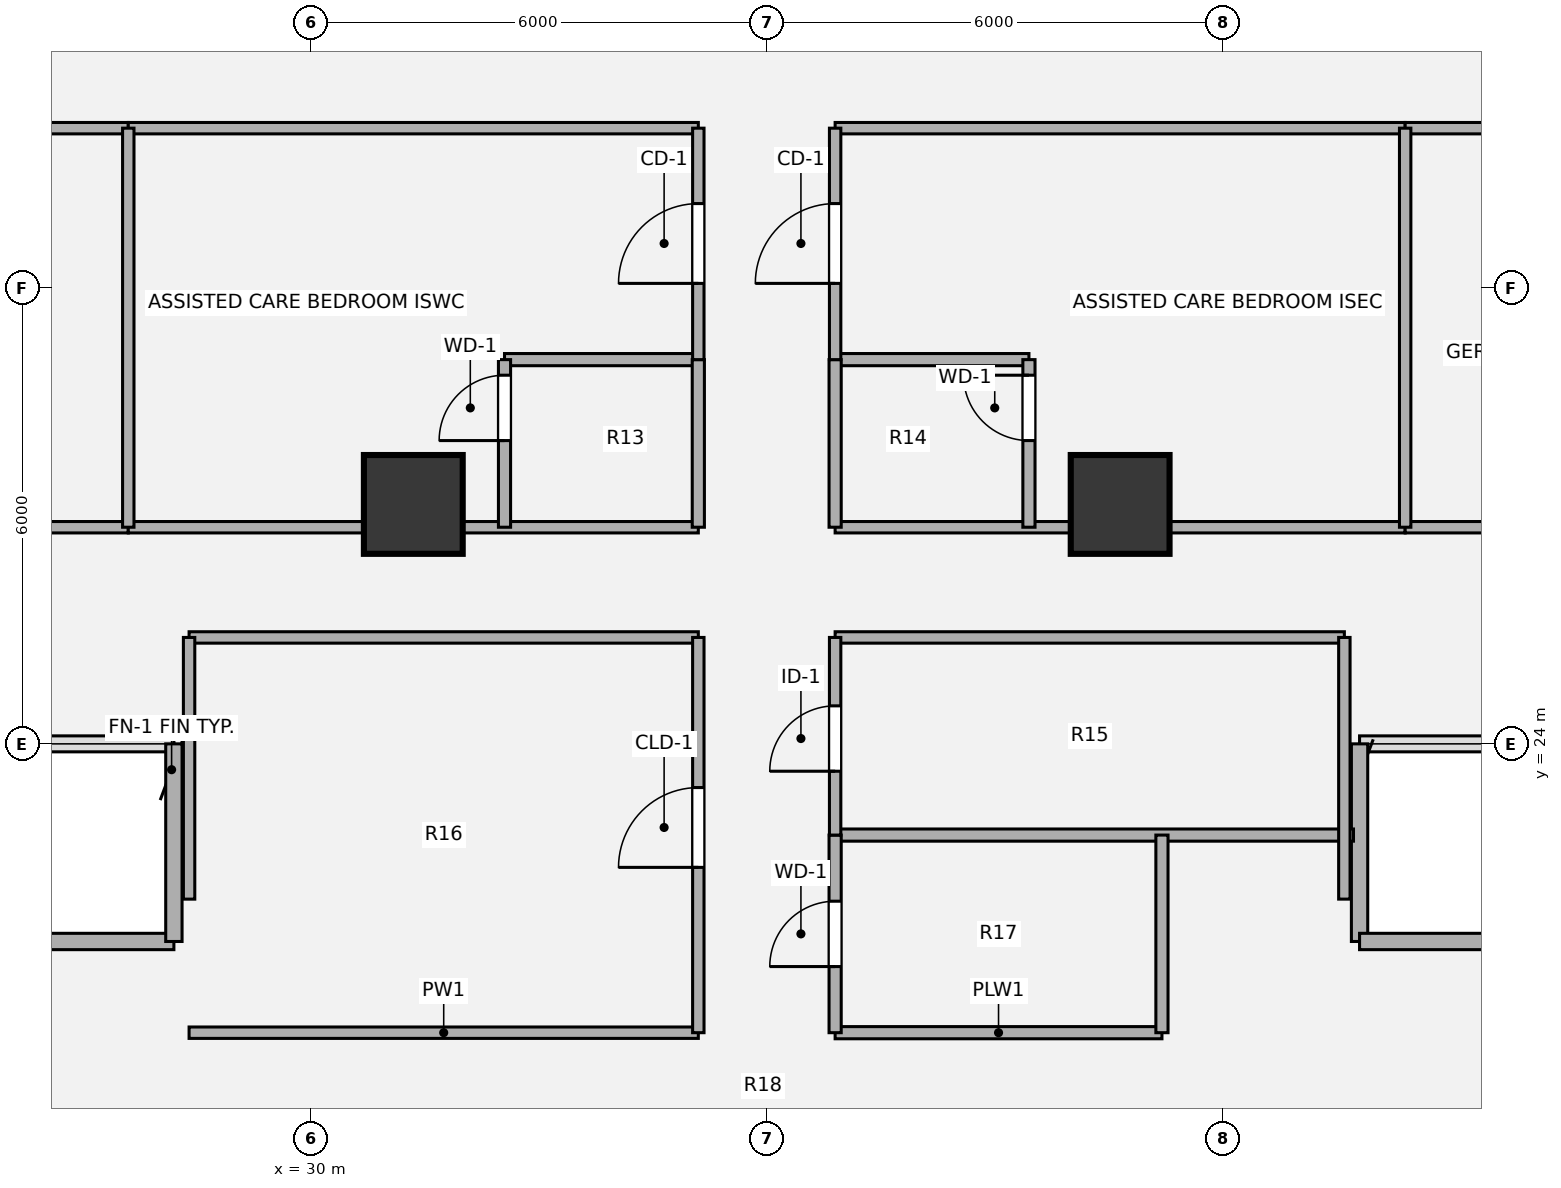
"""IFC4 building model, lengths in metres.
Left out: names, types, materials, properties, quantities, classifications, styles, units other than length and angle.
Written with IfcOpenShell. Run it as: python <this file> out.ifc"""

import sys

from ifc_helpers import new_model, si_unit, direction, frame, frame_2d, origin, origin_2d, place, context, subcontext, project, spatial, rectangle, hollow_circle, extrude, source, transform, mapped, element, fill, save


model = new_model("IFC4")
c1 = context("Model", 3, precision=1e-05, world=origin(), true_north=direction((0.0, 1.0)))
c2 = subcontext(c1, "Body", "Model", "MODEL_VIEW")
j1 = project(units=[si_unit("LENGTHUNIT", "METRE"), si_unit("PLANEANGLEUNIT", "RADIAN")], contexts=[c1])
p1 = place(None, origin())
s1 = spatial("IfcSite", under=j1, at=p1, CompositionType="ELEMENT")
p2 = place(p1, origin())
s2 = spatial("IfcBuilding", under=s1, at=p2, CompositionType="ELEMENT")
p3 = place(p2, frame((0.0, 0.0, 101.16)))
s3 = spatial("IfcBuildingStorey", under=s2, at=p3, CompositionType="ELEMENT", Elevation=101.16)
m1 = source(origin(), c2, "Body", "SweptSolid", [
    extrude(hollow_circle(Radius=0.65, WallThickness=0.045, at=origin_2d()), origin(), (0.0, 0.0, 1.0), 3.78),
])
for number, where, z_axis, x_axis in (
    (1, (31.35, 27.15, 0.0), (0.0, 0.0, 1.0), (1.0, 0.0, 0.0)),
    (2, (40.65, 27.15, 0.0), (0.0, 0.0, 1.0), (1.0, 0.0, 0.0)),
):
    element("IfcColumn", number, at=place(p3, frame(where, z_axis=z_axis, x_axis=x_axis)), inside=s3, PredefinedType="COLUMN", context=c2, shape_type="MappedRepresentation", body=[
        mapped(m1, transform((0.0, 0.0, 0.0), x_axis=(1.0, 0.0, 0.0), y_axis=(0.0, 1.0, 0.0), z_axis=(0.0, 0.0, 1.0), scale=1.0)),
    ])
p4 = place(p3, frame((24.35, 21.4, 0.0), z_axis=(0.0, 0.0, 1.0), x_axis=(1.0, 0.0, 0.0)))
e3 = element("IfcWall", 3, at=p4, inside=s3, PredefinedType="SOLIDWALL", context=c2, shape_type="SweptSolid", body=[
    extrude(rectangle(XDim=3.85, YDim=0.215, at=frame_2d((1.925, 0.0))), origin(), (0.0, 0.0, 1.0), 3.53),
])
for number, where, z_axis, x_axis in (
    (4, (28.2, 21.4, 0.0), (0.0, 0.0, 1.0), (0.0, 1.0, 0.0)),
    (5, (43.8, 24.0, 0.0), (0.0, 0.0, 1.0), (0.0, -1.0, 0.0)),
):
    element("IfcWall", number, at=place(p3, frame(where, z_axis=z_axis, x_axis=x_axis)), inside=s3, PredefinedType="SOLIDWALL", context=c2, shape_type="SweptSolid", body=[
        extrude(rectangle(XDim=2.6, YDim=0.215, at=frame_2d((1.3, 0.0))), origin(), (0.0, 0.0, 1.0), 3.53),
    ])
p5 = place(p3, frame((43.8, 21.4, 0.0), z_axis=(0.0, 0.0, 1.0), x_axis=(1.0, 0.0, 0.0)))
e6 = element("IfcWall", 6, at=p5, inside=s3, PredefinedType="SOLIDWALL", context=c2, shape_type="SweptSolid", body=[
    extrude(rectangle(XDim=3.85, YDim=0.215, at=frame_2d((1.925, 0.0))), origin(), (0.0, 0.0, 1.0), 3.53),
])
p6 = place(p3, frame((28.4, 20.2, 0.0), z_axis=(0.0, 0.0, 1.0), x_axis=(1.0, 0.0, 0.0)))
e7 = element("IfcWall", 7, at=p6, inside=s3, PredefinedType="PARTITIONING", context=c2, shape_type="SweptSolid", body=[
    extrude(rectangle(XDim=6.7, YDim=0.15, at=frame_2d((3.35, 0.0))), origin(), (0.0, 0.0, 1.0), 3.5),
])
p7 = place(p3, frame((36.9, 20.2, 0.0), z_axis=(0.0, 0.0, 1.0), x_axis=(1.0, 0.0, 0.0)))
e8 = element("IfcWall", 8, at=p7, inside=s3, PredefinedType="PLUMBINGWALL", context=c2, shape_type="SweptSolid", body=[
    extrude(rectangle(XDim=4.3, YDim=0.16, at=frame_2d((2.15, 0.0))), origin(), (0.0, 0.0, 1.0), 3.5),
])
p8 = place(p3, frame((36.9, 22.8, 0.0), z_axis=(0.0, 0.0, 1.0), x_axis=(1.0, 0.0, 0.0)))
e9 = element("IfcWall", 9, at=p8, inside=s3, PredefinedType="PLUMBINGWALL", context=c2, shape_type="SweptSolid", body=[
    extrude(rectangle(XDim=6.82, YDim=0.16, at=frame_2d((3.41, 0.0))), origin(), (0.0, 0.0, 1.0), 3.5),
])
for number, where, z_axis, x_axis in (
    (10, (28.4, 25.4, 0.0), (0.0, 0.0, 1.0), (1.0, 0.0, 0.0)),
    (11, (36.9, 25.4, 0.0), (0.0, 0.0, 1.0), (1.0, 0.0, 0.0)),
):
    element("IfcWall", number, at=place(p3, frame(where, z_axis=z_axis, x_axis=x_axis)), inside=s3, PredefinedType="PARTITIONING", context=c2, shape_type="SweptSolid", body=[
        extrude(rectangle(XDim=6.7, YDim=0.15, at=frame_2d((3.35, 0.0))), origin(), (0.0, 0.0, 1.0), 3.5),
    ])
p9 = place(p3, frame((22.4, 26.85, 0.0), z_axis=(0.0, 0.0, 1.0), x_axis=(1.0, 0.0, 0.0)))
e12 = element("IfcWall", 12, at=p9, inside=s3, PredefinedType="PARTITIONING", context=c2, shape_type="SweptSolid", body=[
    extrude(rectangle(XDim=5.2, YDim=0.15, at=frame_2d((2.6, 0.0))), origin(), (0.0, 0.0, 1.0), 3.055),
])
for number, where, z_axis, x_axis in (
    (13, (27.6, 26.85, 0.0), (0.0, 0.0, 1.0), (1.0, 0.0, 0.0)),
    (14, (36.9, 26.85, 0.0), (0.0, 0.0, 1.0), (1.0, 0.0, 0.0)),
):
    element("IfcWall", number, at=place(p3, frame(where, z_axis=z_axis, x_axis=x_axis)), inside=s3, PredefinedType="PARTITIONING", context=c2, shape_type="SweptSolid", body=[
        extrude(rectangle(XDim=7.5, YDim=0.15, at=frame_2d((3.75, 0.0))), origin(), (0.0, 0.0, 1.0), 2.903),
    ])
p10 = place(p3, frame((44.4, 26.85, 0.0), z_axis=(0.0, 0.0, 1.0), x_axis=(1.0, 0.0, 0.0)))
e15 = element("IfcWall", 15, at=p10, inside=s3, PredefinedType="PARTITIONING", context=c2, shape_type="SweptSolid", body=[
    extrude(rectangle(XDim=5.2, YDim=0.15, at=frame_2d((2.6, 0.0))), origin(), (0.0, 0.0, 1.0), 3.055),
])
for number, where, z_axis, x_axis in (
    (16, (32.55, 29.055, 0.0), (0.0, 0.0, 1.0), (1.0, 0.0, 0.0)),
    (17, (36.9, 29.055, 0.0), (0.0, 0.0, 1.0), (1.0, 0.0, 0.0)),
):
    element("IfcWall", number, at=place(p3, frame(where, z_axis=z_axis, x_axis=x_axis)), inside=s3, PredefinedType="PLUMBINGWALL", context=c2, shape_type="SweptSolid", body=[
        extrude(rectangle(XDim=2.55, YDim=0.16, at=frame_2d((1.275, 0.0))), origin(), (0.0, 0.0, 1.0), 3.259),
    ])
p11 = place(p3, frame((22.4, 32.1, 0.0), z_axis=(0.0, 0.0, 1.0), x_axis=(1.0, 0.0, 0.0)))
e18 = element("IfcWall", 18, at=p11, inside=s3, PredefinedType="PARTITIONING", context=c2, shape_type="SweptSolid", body=[
    extrude(rectangle(XDim=5.2, YDim=0.15, at=frame_2d((2.6, 0.0))), origin(), (0.0, 0.0, 1.0), 2.982),
])
p12 = place(p11, frame((2.075, 0.0, 0.0)))
e19 = element("IfcOpeningElement", 19, at=p12, cuts=e18, PredefinedType="OPENING", context=c2, shape_type="SweptSolid", body=[
    extrude(rectangle(XDim=1.05, YDim=2.1, at=origin_2d()), frame((0.525, 0.085, 1.05), z_axis=(0.0, -1.0, 0.0), x_axis=(1.0, 0.0, 0.0)), (0.0, 0.0, 1.0), 0.17),
])
for number, where, z_axis, x_axis in (
    (20, (27.6, 32.1, 0.0), (0.0, 0.0, 1.0), (1.0, 0.0, 0.0)),
    (21, (36.9, 32.1, 0.0), (0.0, 0.0, 1.0), (1.0, 0.0, 0.0)),
):
    element("IfcWall", number, at=place(p3, frame(where, z_axis=z_axis, x_axis=x_axis)), inside=s3, PredefinedType="PARTITIONING", context=c2, shape_type="SweptSolid", body=[
        extrude(rectangle(XDim=7.5, YDim=0.15, at=frame_2d((3.75, 0.0))), origin(), (0.0, 0.0, 1.0), 2.982),
    ])
p13 = place(p3, frame((44.4, 32.1, 0.0), z_axis=(0.0, 0.0, 1.0), x_axis=(1.0, 0.0, 0.0)))
e22 = element("IfcWall", 22, at=p13, inside=s3, PredefinedType="PARTITIONING", context=c2, shape_type="SweptSolid", body=[
    extrude(rectangle(XDim=5.2, YDim=0.15, at=frame_2d((2.6, 0.0))), origin(), (0.0, 0.0, 1.0), 2.982),
])
p14 = place(p13, frame((2.075, 0.0, 0.0)))
e23 = element("IfcOpeningElement", 23, at=p14, cuts=e22, PredefinedType="OPENING", context=c2, shape_type="SweptSolid", body=[
    extrude(rectangle(XDim=1.05, YDim=2.1, at=origin_2d()), frame((0.525, 0.085, 1.05), z_axis=(0.0, -1.0, 0.0), x_axis=(1.0, 0.0, 0.0)), (0.0, 0.0, 1.0), 0.17),
])
p15 = place(p3, frame((27.6, 26.85, 0.0), z_axis=(0.0, 0.0, 1.0), x_axis=(0.0, 1.0, 0.0)))
e24 = element("IfcWall", 24, at=p15, inside=s3, PredefinedType="PARTITIONING", context=c2, shape_type="SweptSolid", body=[
    extrude(rectangle(XDim=5.25, YDim=0.15, at=frame_2d((2.625, 0.0))), origin(), (0.0, 0.0, 1.0), 3.5),
])
p16 = place(p3, frame((28.4, 21.957, 0.0), z_axis=(0.0, 0.0, 1.0), x_axis=(0.0, 1.0, 0.0)))
e25 = element("IfcWall", 25, at=p16, inside=s3, PredefinedType="PARTITIONING", context=c2, shape_type="SweptSolid", body=[
    extrude(rectangle(XDim=3.443, YDim=0.15, at=frame_2d((1.721, 0.0))), origin(), (0.0, 0.0, 1.0), 3.5),
])
p17 = place(p3, frame((32.55, 26.85, 0.0), z_axis=(0.0, 0.0, 1.0), x_axis=(0.0, 1.0, 0.0)))
e26 = element("IfcWall", 26, at=p17, inside=s3, PredefinedType="PLUMBINGWALL", context=c2, shape_type="SweptSolid", body=[
    extrude(rectangle(XDim=2.205, YDim=0.16, at=frame_2d((1.103, 0.0))), origin(), (0.0, 0.0, 1.0), 3.5),
])
p18 = place(p17, frame((1.14, 0.0, 0.0)))
e27 = element("IfcOpeningElement", 27, at=p18, cuts=e26, PredefinedType="OPENING", context=c2, shape_type="SweptSolid", body=[
    extrude(rectangle(XDim=0.86, YDim=2.1, at=origin_2d()), frame((0.43, 0.09, 1.05), z_axis=(0.0, -1.0, 0.0), x_axis=(1.0, 0.0, 0.0)), (0.0, 0.0, 1.0), 0.18),
])
p19 = place(p3, frame((35.1, 20.2, 0.0), z_axis=(0.0, 0.0, 1.0), x_axis=(0.0, 1.0, 0.0)))
e28 = element("IfcWall", 28, at=p19, inside=s3, PredefinedType="PARTITIONING", context=c2, shape_type="SweptSolid", body=[
    extrude(rectangle(XDim=5.2, YDim=0.15, at=frame_2d((2.6, 0.0))), origin(), (0.0, 0.0, 1.0), 3.5),
])
p20 = place(p19, frame((2.175, 0.0, 0.0)))
e29 = element("IfcOpeningElement", 29, at=p20, cuts=e28, PredefinedType="OPENING", context=c2, shape_type="SweptSolid", body=[
    extrude(rectangle(XDim=1.05, YDim=2.1, at=origin_2d()), frame((0.525, 0.085, 1.05), z_axis=(0.0, -1.0, 0.0), x_axis=(1.0, 0.0, 0.0)), (0.0, 0.0, 1.0), 0.17),
])
p21 = place(p3, frame((35.1, 26.85, 0.0), z_axis=(0.0, 0.0, 1.0), x_axis=(0.0, 1.0, 0.0)))
e30 = element("IfcWall", 30, at=p21, inside=s3, PredefinedType="PLUMBINGWALL", context=c2, shape_type="SweptSolid", body=[
    extrude(rectangle(XDim=2.205, YDim=0.16, at=frame_2d((1.103, 0.0))), origin(), (0.0, 0.0, 1.0), 3.5),
])
p22 = place(p3, frame((35.1, 29.055, 0.0), z_axis=(0.0, 0.0, 1.0), x_axis=(0.0, 1.0, 0.0)))
e31 = element("IfcWall", 31, at=p22, inside=s3, PredefinedType="PARTITIONING", context=c2, shape_type="SweptSolid", body=[
    extrude(rectangle(XDim=3.045, YDim=0.15, at=frame_2d((1.522, 0.0))), origin(), (0.0, 0.0, 1.0), 3.5),
])
p23 = place(p22, frame((1.003, 0.0, 0.0)))
e32 = element("IfcOpeningElement", 32, at=p23, cuts=e31, PredefinedType="OPENING", context=c2, shape_type="SweptSolid", body=[
    extrude(rectangle(XDim=1.05, YDim=2.1, at=origin_2d()), frame((0.525, 0.085, 1.05), z_axis=(0.0, -1.0, 0.0), x_axis=(1.0, 0.0, 0.0)), (0.0, 0.0, 1.0), 0.17),
])
p24 = place(p3, frame((36.9, 20.2, 0.0), z_axis=(0.0, 0.0, 1.0), x_axis=(0.0, 1.0, 0.0)))
e33 = element("IfcWall", 33, at=p24, inside=s3, PredefinedType="PLUMBINGWALL", context=c2, shape_type="SweptSolid", body=[
    extrude(rectangle(XDim=2.6, YDim=0.16, at=frame_2d((1.3, 0.0))), origin(), (0.0, 0.0, 1.0), 3.5),
])
p25 = place(p24, frame((0.87, 0.0, 0.0)))
e34 = element("IfcOpeningElement", 34, at=p25, cuts=e33, PredefinedType="OPENING", context=c2, shape_type="SweptSolid", body=[
    extrude(rectangle(XDim=0.86, YDim=2.1, at=origin_2d()), frame((0.43, 0.09, 1.05), z_axis=(0.0, -1.0, 0.0), x_axis=(1.0, 0.0, 0.0)), (0.0, 0.0, 1.0), 0.18),
])
p26 = place(p3, frame((36.9, 22.8, 0.0), z_axis=(0.0, 0.0, 1.0), x_axis=(0.0, 1.0, 0.0)))
e35 = element("IfcWall", 35, at=p26, inside=s3, PredefinedType="PARTITIONING", context=c2, shape_type="SweptSolid", body=[
    extrude(rectangle(XDim=2.6, YDim=0.15, at=frame_2d((1.3, 0.0))), origin(), (0.0, 0.0, 1.0), 3.5),
])
p27 = place(p26, frame((0.84, 0.0, 0.0)))
e36 = element("IfcOpeningElement", 36, at=p27, cuts=e35, PredefinedType="OPENING", context=c2, shape_type="SweptSolid", body=[
    extrude(rectangle(XDim=0.86, YDim=2.1, at=origin_2d()), frame((0.43, 0.085, 1.05), z_axis=(0.0, -1.0, 0.0), x_axis=(1.0, 0.0, 0.0)), (0.0, 0.0, 1.0), 0.17),
])
p28 = place(p3, frame((36.9, 26.85, 0.0), z_axis=(0.0, 0.0, 1.0), x_axis=(0.0, 1.0, 0.0)))
e37 = element("IfcWall", 37, at=p28, inside=s3, PredefinedType="PLUMBINGWALL", context=c2, shape_type="SweptSolid", body=[
    extrude(rectangle(XDim=2.205, YDim=0.16, at=frame_2d((1.103, 0.0))), origin(), (0.0, 0.0, 1.0), 3.5),
])
p29 = place(p3, frame((36.9, 29.055, 0.0), z_axis=(0.0, 0.0, 1.0), x_axis=(0.0, 1.0, 0.0)))
e38 = element("IfcWall", 38, at=p29, inside=s3, PredefinedType="PARTITIONING", context=c2, shape_type="SweptSolid", body=[
    extrude(rectangle(XDim=3.045, YDim=0.15, at=frame_2d((1.522, 0.0))), origin(), (0.0, 0.0, 1.0), 3.5),
])
p30 = place(p29, frame((1.003, 0.0, 0.0)))
e39 = element("IfcOpeningElement", 39, at=p30, cuts=e38, PredefinedType="OPENING", context=c2, shape_type="SweptSolid", body=[
    extrude(rectangle(XDim=1.05, YDim=2.1, at=origin_2d()), frame((0.525, 0.085, 1.05), z_axis=(0.0, -1.0, 0.0), x_axis=(1.0, 0.0, 0.0)), (0.0, 0.0, 1.0), 0.17),
])
p31 = place(p3, frame((39.45, 26.85, 0.0), z_axis=(0.0, 0.0, 1.0), x_axis=(0.0, 1.0, 0.0)))
e40 = element("IfcWall", 40, at=p31, inside=s3, PredefinedType="PLUMBINGWALL", context=c2, shape_type="SweptSolid", body=[
    extrude(rectangle(XDim=2.205, YDim=0.16, at=frame_2d((1.103, 0.0))), origin(), (0.0, 0.0, 1.0), 3.5),
])
p32 = place(p31, frame((1.14, 0.0, 0.0)))
e41 = element("IfcOpeningElement", 41, at=p32, cuts=e40, PredefinedType="OPENING", context=c2, shape_type="SweptSolid", body=[
    extrude(rectangle(XDim=0.86, YDim=2.1, at=origin_2d()), frame((0.43, 0.09, 1.05), z_axis=(0.0, -1.0, 0.0), x_axis=(1.0, 0.0, 0.0)), (0.0, 0.0, 1.0), 0.18),
])
p33 = place(p3, frame((41.2, 20.2, 0.0), z_axis=(0.0, 0.0, 1.0), x_axis=(0.0, 1.0, 0.0)))
e42 = element("IfcWall", 42, at=p33, inside=s3, PredefinedType="PLUMBINGWALL", context=c2, shape_type="SweptSolid", body=[
    extrude(rectangle(XDim=2.6, YDim=0.16, at=frame_2d((1.3, 0.0))), origin(), (0.0, 0.0, 1.0), 2.815),
])
p34 = place(p3, frame((43.6, 21.958, 0.0), z_axis=(0.0, 0.0, 1.0), x_axis=(0.0, 1.0, 0.0)))
e43 = element("IfcWall", 43, at=p34, inside=s3, PredefinedType="PARTITIONING", context=c2, shape_type="SweptSolid", body=[
    extrude(rectangle(XDim=3.442, YDim=0.15, at=frame_2d((1.721, 0.0))), origin(), (0.0, 0.0, 1.0), 3.5),
])
p35 = place(p3, frame((44.4, 26.85, 0.0), z_axis=(0.0, 0.0, 1.0), x_axis=(0.0, 1.0, 0.0)))
e44 = element("IfcWall", 44, at=p35, inside=s3, PredefinedType="PARTITIONING", context=c2, shape_type="SweptSolid", body=[
    extrude(rectangle(XDim=5.25, YDim=0.15, at=frame_2d((2.625, 0.0))), origin(), (0.0, 0.0, 1.0), 3.5),
])
m2 = source(origin(), c2, "Body", "SweptSolid", [
    extrude(rectangle(XDim=0.86, YDim=2.1, at=origin_2d()), frame((0.43, 0.025, 1.05), z_axis=(0.0, -1.0, 0.0), x_axis=(1.0, 0.0, 0.0)), (0.0, 0.0, 1.0), 0.05),
])
p36 = place(p18, origin())
e45 = element("IfcDoor", 45, at=p36, inside=s3, OperationType="SINGLE_SWING_LEFT", PredefinedType="DOOR", context=c2, shape_type="MappedRepresentation", body=[
    mapped(m2, transform((0.0, 0.0, 0.0), x_axis=(1.0, 0.0, 0.0), y_axis=(0.0, 1.0, 0.0), z_axis=(0.0, 0.0, 1.0), scale=1.0)),
])
fill(e27, e45)
m3 = source(origin(), c2, "Body", "SweptSolid", [
    extrude(rectangle(XDim=1.05, YDim=2.1, at=origin_2d()), frame((0.525, 0.025, 1.05), z_axis=(0.0, -1.0, 0.0), x_axis=(1.0, 0.0, 0.0)), (0.0, 0.0, 1.0), 0.05),
])
p37 = place(p20, origin())
e46 = element("IfcDoor", 46, at=p37, inside=s3, OperationType="SINGLE_SWING_LEFT", PredefinedType="DOOR", context=c2, shape_type="MappedRepresentation", body=[
    mapped(m3, transform((0.0, 0.0, 0.0), x_axis=(1.0, 0.0, 0.0), y_axis=(0.0, 1.0, 0.0), z_axis=(0.0, 0.0, 1.0), scale=1.0)),
])
fill(e29, e46)
m4 = source(origin(), c2, "Body", "SweptSolid", [
    extrude(rectangle(XDim=1.05, YDim=2.1, at=origin_2d()), frame((0.525, 0.025, 1.05), z_axis=(0.0, -1.0, 0.0), x_axis=(1.0, 0.0, 0.0)), (0.0, 0.0, 1.0), 0.05),
])
p38 = place(p23, origin())
e47 = element("IfcDoor", 47, at=p38, inside=s3, OperationType="SINGLE_SWING_LEFT", PredefinedType="DOOR", context=c2, shape_type="MappedRepresentation", body=[
    mapped(m4, transform((0.0, 0.0, 0.0), x_axis=(1.0, 0.0, 0.0), y_axis=(0.0, 1.0, 0.0), z_axis=(0.0, 0.0, 1.0), scale=1.0)),
])
fill(e32, e47)
p39 = place(p25, origin())
e48 = element("IfcDoor", 48, at=p39, inside=s3, OperationType="SINGLE_SWING_LEFT", PredefinedType="DOOR", context=c2, shape_type="MappedRepresentation", body=[
    mapped(m2, transform((0.0, 0.0, 0.0), x_axis=(1.0, 0.0, 0.0), y_axis=(0.0, 1.0, 0.0), z_axis=(0.0, 0.0, 1.0), scale=1.0)),
])
fill(e34, e48)
m5 = source(origin(), c2, "Body", "SweptSolid", [
    extrude(rectangle(XDim=0.86, YDim=2.1, at=origin_2d()), frame((0.43, 0.025, 1.05), z_axis=(0.0, -1.0, 0.0), x_axis=(1.0, 0.0, 0.0)), (0.0, 0.0, 1.0), 0.05),
])
p40 = place(p27, origin())
e49 = element("IfcDoor", 49, at=p40, inside=s3, OperationType="SINGLE_SWING_LEFT", PredefinedType="DOOR", context=c2, shape_type="MappedRepresentation", body=[
    mapped(m5, transform((0.0, 0.0, 0.0), x_axis=(1.0, 0.0, 0.0), y_axis=(0.0, 1.0, 0.0), z_axis=(0.0, 0.0, 1.0), scale=1.0)),
])
fill(e36, e49)
p41 = place(p30, origin())
e50 = element("IfcDoor", 50, at=p41, inside=s3, OperationType="SINGLE_SWING_LEFT", PredefinedType="DOOR", context=c2, shape_type="MappedRepresentation", body=[
    mapped(m4, transform((0.0, 0.0, 0.0), x_axis=(1.0, 0.0, 0.0), y_axis=(0.0, 1.0, 0.0), z_axis=(0.0, 0.0, 1.0), scale=1.0)),
])
fill(e39, e50)
p42 = place(p32, origin())
e51 = element("IfcDoor", 51, at=p42, inside=s3, OperationType="SINGLE_SWING_RIGHT", PredefinedType="DOOR", context=c2, shape_type="MappedRepresentation", body=[
    mapped(m2, transform((0.0, 0.0, 0.0), x_axis=(1.0, 0.0, 0.0), y_axis=(0.0, 1.0, 0.0), z_axis=(0.0, 0.0, 1.0), scale=1.0)),
])
fill(e41, e51)
save(model, sys.argv[1])
